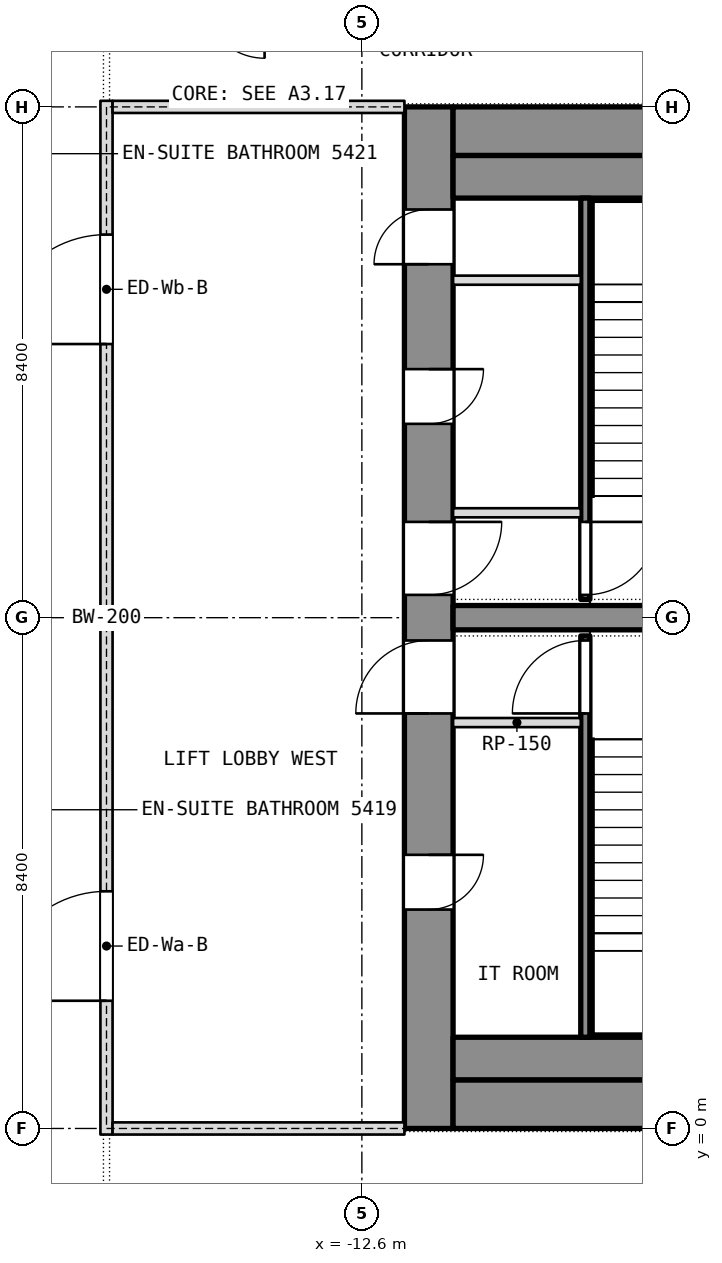
"""IFC4 building model, lengths in metres.
Left out: names, types, materials, properties, quantities, classifications, styles, units other than length and angle.
Written with IfcOpenShell. Run it as: python <this file> out.ifc"""

import sys

from ifc_helpers import new_model, si_unit, direction, frame, frame_2d, origin, place, context, subcontext, project, spatial, rectangle, extrude, element, fill, save


model = new_model("IFC4")
c1 = context("Model", 3, precision=1e-05, world=origin(), true_north=direction((0.0, 1.0)))
c2 = subcontext(c1, "Body", "Model", "MODEL_VIEW")
j1 = project(units=[si_unit("LENGTHUNIT", "METRE"), si_unit("PLANEANGLEUNIT", "RADIAN")], contexts=[c1])
p1 = place(None, origin())
s1 = spatial("IfcSite", under=j1, at=p1, CompositionType="ELEMENT")
p2 = place(p1, origin())
s2 = spatial("IfcBuilding", under=s1, at=p2, CompositionType="ELEMENT")
p3 = place(p2, frame((0.0, 0.0, 230.9)))
s3 = spatial("IfcBuildingStorey", under=s2, at=p3, CompositionType="ELEMENT", Elevation=230.9)
p4 = place(p3, frame((-11.5, 0.0, 0.0), z_axis=(0.0, 0.0, 1.0), x_axis=(0.0, 1.0, 0.0)))
e1 = element("IfcWall", 1, at=p4, inside=s3, PredefinedType="SHEAR", context=c2, shape_type="SweptSolid", body=[
    extrude(rectangle(XDim=16.8, YDim=0.8, at=frame_2d((8.4, 0.0))), origin(), (0.0, 0.0, 1.0), 3.6),
])
p5 = place(p4, frame((3.6, 0.0, 0.0)))
e2 = element("IfcOpeningElement", 2, at=p5, cuts=e1, PredefinedType="OPENING", context=c2, shape_type="SweptSolid", body=[
    extrude(rectangle(XDim=0.9, YDim=2.1, at=frame_2d((0.45, 1.05))), frame((0.0, 0.4, 0.0), z_axis=(0.0, -1.0, 0.0), x_axis=(1.0, 0.0, 0.0)), (0.0, 0.0, 1.0), 0.8),
])
p6 = place(p4, frame((6.825, 0.0, 0.0)))
e3 = element("IfcOpeningElement", 3, at=p6, cuts=e1, PredefinedType="OPENING", context=c2, shape_type="SweptSolid", body=[
    extrude(rectangle(XDim=1.2, YDim=2.1, at=frame_2d((0.6, 1.05))), frame((0.0, 0.4, 0.0), z_axis=(0.0, -1.0, 0.0), x_axis=(1.0, 0.0, 0.0)), (0.0, 0.0, 1.0), 0.8),
])
p7 = place(p4, frame((14.212, 0.0, 0.0)))
e4 = element("IfcOpeningElement", 4, at=p7, cuts=e1, PredefinedType="OPENING", context=c2, shape_type="SweptSolid", body=[
    extrude(rectangle(XDim=0.9, YDim=2.1, at=frame_2d((0.45, 1.05))), frame((0.0, 0.4, 0.0), z_axis=(0.0, -1.0, 0.0), x_axis=(1.0, 0.0, 0.0)), (0.0, 0.0, 1.0), 0.8),
])
p8 = place(p4, frame((11.587, 0.0, 0.0)))
e5 = element("IfcOpeningElement", 5, at=p8, cuts=e1, PredefinedType="OPENING", context=c2, shape_type="SweptSolid", body=[
    extrude(rectangle(XDim=0.9, YDim=2.1, at=frame_2d((0.45, 1.05))), frame((0.0, 0.4, 0.0), z_axis=(0.0, -1.0, 0.0), x_axis=(1.0, 0.0, 0.0)), (0.0, 0.0, 1.0), 0.8),
])
p9 = place(p4, frame((8.775, 0.0, 0.0)))
e6 = element("IfcOpeningElement", 6, at=p9, cuts=e1, PredefinedType="OPENING", context=c2, shape_type="SweptSolid", body=[
    extrude(rectangle(XDim=1.2, YDim=2.1, at=frame_2d((0.6, 1.05))), frame((0.0, 0.4, 0.0), z_axis=(0.0, -1.0, 0.0), x_axis=(1.0, 0.0, 0.0)), (0.0, 0.0, 1.0), 0.8),
])
for number, where, z_axis, x_axis in (
    (7, (-11.1, 0.4, 0.0), (0.0, 0.0, 1.0), (1.0, 0.0, 0.0)),
    (8, (-11.1, 16.4, 0.0), (0.0, 0.0, 1.0), (1.0, 0.0, 0.0)),
):
    element("IfcWall", number, at=place(p3, frame(where, z_axis=z_axis, x_axis=x_axis)), inside=s3, PredefinedType="SHEAR", context=c2, shape_type="SweptSolid", body=[
        extrude(rectangle(XDim=22.2, YDim=0.8, at=frame_2d((11.1, 0.0))), origin(), (0.0, 0.0, 1.0), 3.6),
    ])
p10 = place(p3, frame((-11.1, 8.4, 0.0), z_axis=(0.0, 0.0, 1.0), x_axis=(1.0, 0.0, 0.0)))
e9 = element("IfcWall", 9, at=p10, inside=s3, PredefinedType="SHEAR", context=c2, shape_type="SweptSolid", body=[
    extrude(rectangle(XDim=6.7, YDim=0.4, at=frame_2d((3.35, 0.0))), origin(), (0.0, 0.0, 1.0), 3.6),
])
for number, where, z_axis, x_axis in (
    (10, (-11.1, 1.15, 0.0), (0.0, 0.0, 1.0), (1.0, 0.0, 0.0)),
    (11, (-11.1, 15.65, 0.0), (0.0, 0.0, 1.0), (1.0, 0.0, 0.0)),
):
    element("IfcWall", number, at=place(p3, frame(where, z_axis=z_axis, x_axis=x_axis)), inside=s3, PredefinedType="PARTITIONING", context=c2, shape_type="SweptSolid", body=[
        extrude(rectangle(XDim=22.2, YDim=0.7, at=frame_2d((11.1, 0.0))), origin(), (0.0, 0.0, 1.0), 3.34),
    ])
p11 = place(p3, frame((-8.925, 1.5, 0.0), z_axis=(0.0, 0.0, 1.0), x_axis=(0.0, 1.0, 0.0)))
e12 = element("IfcWall", 12, at=p11, inside=s3, PredefinedType="SHEAR", context=c2, shape_type="SweptSolid", body=[
    extrude(rectangle(XDim=6.6, YDim=0.15, at=frame_2d((3.3, 0.0))), origin(), (0.0, 0.0, 1.0), 3.34),
])
p12 = place(p11, frame((5.325, 0.0, 0.0)))
e13 = element("IfcOpeningElement", 13, at=p12, cuts=e12, PredefinedType="OPENING", context=c2, shape_type="SweptSolid", body=[
    extrude(rectangle(XDim=1.2, YDim=2.1, at=frame_2d((0.6, 1.05))), frame((0.0, 0.075, 0.0), z_axis=(0.0, -1.0, 0.0), x_axis=(1.0, 0.0, 0.0)), (0.0, 0.0, 1.0), 0.15),
])
p13 = place(p3, frame((-11.1, 6.675, 0.0), z_axis=(0.0, 0.0, 1.0), x_axis=(1.0, 0.0, 0.0)))
e14 = element("IfcWall", 14, at=p13, inside=s3, PredefinedType="PARTITIONING", context=c2, shape_type="SweptSolid", body=[
    extrude(rectangle(XDim=2.1, YDim=0.15, at=frame_2d((1.05, 0.0))), origin(), (0.0, 0.0, 1.0), 3.34),
])
p14 = place(p3, frame((-8.925, 8.7, 0.0), z_axis=(0.0, 0.0, 1.0), x_axis=(0.0, 1.0, 0.0)))
e15 = element("IfcWall", 15, at=p14, inside=s3, PredefinedType="SHEAR", context=c2, shape_type="SweptSolid", body=[
    extrude(rectangle(XDim=6.6, YDim=0.15, at=frame_2d((3.3, 0.0))), origin(), (0.0, 0.0, 1.0), 3.34),
])
p15 = place(p14, frame((0.075, 0.0, 0.0)))
e16 = element("IfcOpeningElement", 16, at=p15, cuts=e15, PredefinedType="OPENING", context=c2, shape_type="SweptSolid", body=[
    extrude(rectangle(XDim=1.2, YDim=2.1, at=frame_2d((0.6, 1.05))), frame((0.0, 0.075, 0.0), z_axis=(0.0, -1.0, 0.0), x_axis=(1.0, 0.0, 0.0)), (0.0, 0.0, 1.0), 0.15),
])
for number, where, z_axis, x_axis in (
    (17, (-11.1, 10.125, 0.0), (0.0, 0.0, 1.0), (1.0, 0.0, 0.0)),
    (18, (-11.1, 13.95, 0.0), (0.0, 0.0, 1.0), (1.0, 0.0, 0.0)),
):
    element("IfcWall", number, at=place(p3, frame(where, z_axis=z_axis, x_axis=x_axis)), inside=s3, PredefinedType="PARTITIONING", context=c2, shape_type="SweptSolid", body=[
        extrude(rectangle(XDim=2.1, YDim=0.15, at=frame_2d((1.05, 0.0))), origin(), (0.0, 0.0, 1.0), 3.34),
    ])
p16 = place(p3, frame((-16.8, -0.1, 0.0), z_axis=(0.0, 0.0, 1.0), x_axis=(0.0, 1.0, 0.0)))
e19 = element("IfcWall", 19, at=p16, inside=s3, PredefinedType="PARTITIONING", context=c2, shape_type="SweptSolid", body=[
    extrude(rectangle(XDim=17.0, YDim=0.2, at=frame_2d((8.5, 0.0))), origin(), (0.0, 0.0, 1.0), 3.34),
])
p17 = place(p16, frame((2.2, 0.0, 0.0)))
e20 = element("IfcOpeningElement", 20, at=p17, cuts=e19, PredefinedType="OPENING", context=c2, shape_type="SweptSolid", body=[
    extrude(rectangle(XDim=1.8, YDim=2.1, at=frame_2d((0.9, 1.05))), frame((0.0, 0.1, 0.0), z_axis=(0.0, -1.0, 0.0), x_axis=(1.0, 0.0, 0.0)), (0.0, 0.0, 1.0), 0.2),
])
p18 = place(p16, frame((13.0, 0.0, 0.0)))
e21 = element("IfcOpeningElement", 21, at=p18, cuts=e19, PredefinedType="OPENING", context=c2, shape_type="SweptSolid", body=[
    extrude(rectangle(XDim=1.8, YDim=2.1, at=frame_2d((0.9, 1.05))), frame((0.0, 0.1, 0.0), z_axis=(0.0, -1.0, 0.0), x_axis=(1.0, 0.0, 0.0)), (0.0, 0.0, 1.0), 0.2),
])
for number, where, z_axis, x_axis in (
    (22, (-16.7, 0.0, 0.0), (0.0, 0.0, 1.0), (1.0, 0.0, 0.0)),
    (23, (-16.7, 16.8, 0.0), (0.0, 0.0, 1.0), (1.0, 0.0, 0.0)),
):
    element("IfcWall", number, at=place(p3, frame(where, z_axis=z_axis, x_axis=x_axis)), inside=s3, PredefinedType="PARTITIONING", context=c2, shape_type="SweptSolid", body=[
        extrude(rectangle(XDim=4.8, YDim=0.2, at=frame_2d((2.4, 0.0))), origin(), (0.0, 0.0, 1.0), 2.94),
    ])
p19 = place(p5, origin())
e24 = element("IfcDoor", 24, at=p19, inside=s3, OperationType="SINGLE_SWING_LEFT", PredefinedType="DOOR", context=c2, shape_type="SweptSolid", body=[
    extrude(rectangle(XDim=0.9, YDim=2.1, at=frame_2d((0.45, 1.05))), frame((0.0, 0.025, 0.0), z_axis=(0.0, -1.0, 0.0), x_axis=(1.0, 0.0, 0.0)), (0.0, 0.0, 1.0), 0.05),
])
fill(e2, e24)
p20 = place(p6, origin())
e25 = element("IfcDoor", 25, at=p20, inside=s3, OperationType="SINGLE_SWING_LEFT", PredefinedType="DOOR", context=c2, shape_type="SweptSolid", body=[
    extrude(rectangle(XDim=1.2, YDim=2.1, at=frame_2d((0.6, 1.05))), frame((0.0, 0.025, 0.0), z_axis=(0.0, -1.0, 0.0), x_axis=(1.0, 0.0, 0.0)), (0.0, 0.0, 1.0), 0.05),
])
fill(e3, e25)
p21 = place(p12, origin())
e26 = element("IfcDoor", 26, at=p21, inside=s3, OperationType="SINGLE_SWING_LEFT", PredefinedType="DOOR", context=c2, shape_type="SweptSolid", body=[
    extrude(rectangle(XDim=1.2, YDim=2.1, at=frame_2d((0.6, 1.05))), frame((0.0, 0.025, 0.0), z_axis=(0.0, -1.0, 0.0), x_axis=(1.0, 0.0, 0.0)), (0.0, 0.0, 1.0), 0.05),
])
fill(e13, e26)
p22 = place(p7, origin())
e27 = element("IfcDoor", 27, at=p22, inside=s3, OperationType="SINGLE_SWING_LEFT", PredefinedType="DOOR", context=c2, shape_type="SweptSolid", body=[
    extrude(rectangle(XDim=0.9, YDim=2.1, at=frame_2d((0.45, 1.05))), frame((0.0, 0.025, 0.0), z_axis=(0.0, -1.0, 0.0), x_axis=(1.0, 0.0, 0.0)), (0.0, 0.0, 1.0), 0.05),
])
fill(e4, e27)
p23 = place(p8, origin())
e28 = element("IfcDoor", 28, at=p23, inside=s3, OperationType="SINGLE_SWING_LEFT", PredefinedType="DOOR", context=c2, shape_type="SweptSolid", body=[
    extrude(rectangle(XDim=0.9, YDim=2.1, at=frame_2d((0.45, 1.05))), frame((0.0, 0.025, 0.0), z_axis=(0.0, -1.0, 0.0), x_axis=(1.0, 0.0, 0.0)), (0.0, 0.0, 1.0), 0.05),
])
fill(e5, e28)
p24 = place(p9, origin())
e29 = element("IfcDoor", 29, at=p24, inside=s3, OperationType="SINGLE_SWING_LEFT", PredefinedType="DOOR", context=c2, shape_type="SweptSolid", body=[
    extrude(rectangle(XDim=1.2, YDim=2.1, at=frame_2d((0.6, 1.05))), frame((0.0, 0.025, 0.0), z_axis=(0.0, -1.0, 0.0), x_axis=(1.0, 0.0, 0.0)), (0.0, 0.0, 1.0), 0.05),
])
fill(e6, e29)
p25 = place(p15, origin())
e30 = element("IfcDoor", 30, at=p25, inside=s3, OperationType="SINGLE_SWING_LEFT", PredefinedType="DOOR", context=c2, shape_type="SweptSolid", body=[
    extrude(rectangle(XDim=1.2, YDim=2.1, at=frame_2d((0.6, 1.05))), frame((0.0, 0.025, 0.0), z_axis=(0.0, -1.0, 0.0), x_axis=(1.0, 0.0, 0.0)), (0.0, 0.0, 1.0), 0.05),
])
fill(e16, e30)
p26 = place(p17, origin())
e31 = element("IfcDoor", 31, at=p26, inside=s3, OperationType="DOUBLE_DOOR_SINGLE_SWING", PredefinedType="DOOR", context=c2, shape_type="SweptSolid", body=[
    extrude(rectangle(XDim=1.8, YDim=2.1, at=frame_2d((0.9, 1.05))), frame((0.0, 0.025, 0.0), z_axis=(0.0, -1.0, 0.0), x_axis=(1.0, 0.0, 0.0)), (0.0, 0.0, 1.0), 0.05),
])
fill(e20, e31)
p27 = place(p18, origin())
e32 = element("IfcDoor", 32, at=p27, inside=s3, OperationType="DOUBLE_DOOR_SINGLE_SWING", PredefinedType="DOOR", context=c2, shape_type="SweptSolid", body=[
    extrude(rectangle(XDim=1.8, YDim=2.1, at=frame_2d((0.9, 1.05))), frame((0.0, 0.025, 0.0), z_axis=(0.0, -1.0, 0.0), x_axis=(1.0, 0.0, 0.0)), (0.0, 0.0, 1.0), 0.05),
])
fill(e21, e32)
save(model, sys.argv[1])
